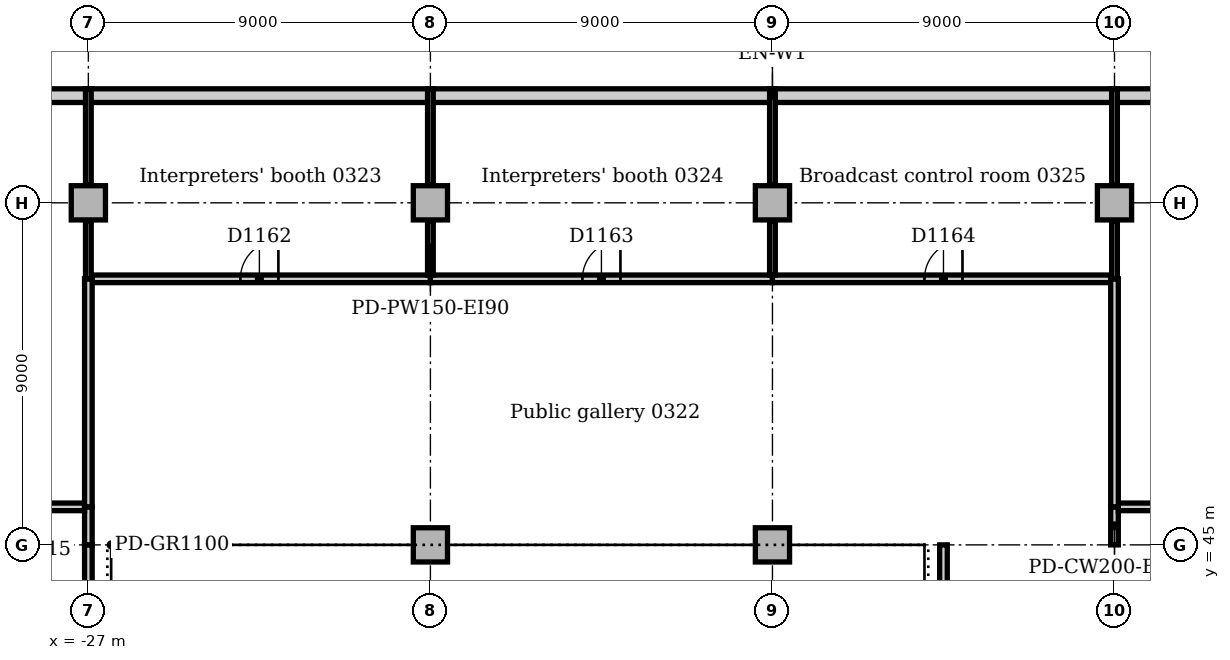
"""IFC4 building model, lengths in metres.
Left out: names, types, materials, properties, quantities, classifications, styles, units other than length and angle.
Written with IfcOpenShell. Run it as: python <this file> out.ifc"""

import sys

from ifc_helpers import new_model, si_unit, direction, frame, frame_2d, origin, origin_2d, place, context, subcontext, project, spatial, rectangle, extrude, element, fill, save


model = new_model("IFC4")
c1 = context("Model", 3, precision=1e-05, world=origin(), true_north=direction((0.0, 1.0)))
c2 = subcontext(c1, "Body", "Model", "MODEL_VIEW")
j1 = project(units=[si_unit("LENGTHUNIT", "METRE"), si_unit("PLANEANGLEUNIT", "RADIAN")], contexts=[c1])
p1 = place(None, origin())
s1 = spatial("IfcSite", under=j1, at=p1, CompositionType="ELEMENT")
p2 = place(p1, origin())
s2 = spatial("IfcBuilding", under=s1, at=p2, CompositionType="ELEMENT")
p3 = place(p2, frame((0.0, 0.0, 16.0)))
s3 = spatial("IfcBuildingStorey", under=s2, at=p3, CompositionType="ELEMENT", Elevation=16.0)
for number, where, z_axis, x_axis in (
    (1, (-27.0, 54.0, 0.0), (0.0, 0.0, 1.0), (1.0, 0.0, 0.0)),
    (2, (-18.0, 45.0, 0.0), (0.0, 0.0, 1.0), (1.0, 0.0, 0.0)),
    (3, (-18.0, 54.0, 0.0), (0.0, 0.0, 1.0), (1.0, 0.0, 0.0)),
    (4, (-9.0, 45.0, 0.0), (0.0, 0.0, 1.0), (1.0, 0.0, 0.0)),
    (5, (-9.0, 54.0, 0.0), (0.0, 0.0, 1.0), (1.0, 0.0, 0.0)),
    (6, (0.0, 54.0, 0.0), (0.0, 0.0, 1.0), (1.0, 0.0, 0.0)),
):
    element("IfcColumn", number, at=place(p3, frame(where, z_axis=z_axis, x_axis=x_axis)), inside=s3, PredefinedType="COLUMN", context=c2, shape_type="SweptSolid", body=[
        extrude(rectangle(XDim=0.9, YDim=0.9, at=origin_2d()), origin(), (0.0, 0.0, 1.0), 4.7),
    ])
p4 = place(p3, frame((63.0, 56.82, 0.0), z_axis=(0.0, 0.0, 1.0), x_axis=(-1.0, 0.0, 0.0)))
e7 = element("IfcWall", 7, at=p4, inside=s3, PredefinedType="STANDARD", context=c2, shape_type="SweptSolid", body=[
    extrude(rectangle(XDim=144.0, YDim=0.36, at=frame_2d((72.0, 0.0))), origin(), (0.0, 0.0, 1.0), 4.7),
])
p5 = place(p4, frame((2.85, 0.0, 0.9)))
e8 = element("IfcOpeningElement", 8, at=p5, cuts=e7, PredefinedType="OPENING", context=c2, shape_type="SweptSolid", body=[
    extrude(rectangle(XDim=3.3, YDim=2.4, at=frame_2d((1.65, 1.2))), frame((0.0, 0.19, 0.0), z_axis=(0.0, -1.0, 0.0), x_axis=(1.0, 0.0, 0.0)), (0.0, 0.0, 1.0), 0.38),
])
p6 = place(p4, frame((7.35, 0.0, 0.9)))
e9 = element("IfcOpeningElement", 9, at=p6, cuts=e7, PredefinedType="OPENING", context=c2, shape_type="SweptSolid", body=[
    extrude(rectangle(XDim=3.3, YDim=2.4, at=frame_2d((1.65, 1.2))), frame((0.0, 0.19, 0.0), z_axis=(0.0, -1.0, 0.0), x_axis=(1.0, 0.0, 0.0)), (0.0, 0.0, 1.0), 0.38),
])
p7 = place(p4, frame((11.85, 0.0, 0.9)))
e10 = element("IfcOpeningElement", 10, at=p7, cuts=e7, PredefinedType="OPENING", context=c2, shape_type="SweptSolid", body=[
    extrude(rectangle(XDim=3.3, YDim=2.4, at=frame_2d((1.65, 1.2))), frame((0.0, 0.19, 0.0), z_axis=(0.0, -1.0, 0.0), x_axis=(1.0, 0.0, 0.0)), (0.0, 0.0, 1.0), 0.38),
])
p8 = place(p4, frame((16.35, 0.0, 0.9)))
e11 = element("IfcOpeningElement", 11, at=p8, cuts=e7, PredefinedType="OPENING", context=c2, shape_type="SweptSolid", body=[
    extrude(rectangle(XDim=3.3, YDim=2.4, at=frame_2d((1.65, 1.2))), frame((0.0, 0.19, 0.0), z_axis=(0.0, -1.0, 0.0), x_axis=(1.0, 0.0, 0.0)), (0.0, 0.0, 1.0), 0.38),
])
p9 = place(p4, frame((20.85, 0.0, 0.9)))
e12 = element("IfcOpeningElement", 12, at=p9, cuts=e7, PredefinedType="OPENING", context=c2, shape_type="SweptSolid", body=[
    extrude(rectangle(XDim=3.3, YDim=2.4, at=frame_2d((1.65, 1.2))), frame((0.0, 0.19, 0.0), z_axis=(0.0, -1.0, 0.0), x_axis=(1.0, 0.0, 0.0)), (0.0, 0.0, 1.0), 0.38),
])
p10 = place(p4, frame((25.35, 0.0, 0.9)))
e13 = element("IfcOpeningElement", 13, at=p10, cuts=e7, PredefinedType="OPENING", context=c2, shape_type="SweptSolid", body=[
    extrude(rectangle(XDim=3.3, YDim=2.4, at=frame_2d((1.65, 1.2))), frame((0.0, 0.19, 0.0), z_axis=(0.0, -1.0, 0.0), x_axis=(1.0, 0.0, 0.0)), (0.0, 0.0, 1.0), 0.38),
])
p11 = place(p4, frame((29.85, 0.0, 0.9)))
e14 = element("IfcOpeningElement", 14, at=p11, cuts=e7, PredefinedType="OPENING", context=c2, shape_type="SweptSolid", body=[
    extrude(rectangle(XDim=3.3, YDim=2.4, at=frame_2d((1.65, 1.2))), frame((0.0, 0.19, 0.0), z_axis=(0.0, -1.0, 0.0), x_axis=(1.0, 0.0, 0.0)), (0.0, 0.0, 1.0), 0.38),
])
p12 = place(p4, frame((34.35, 0.0, 0.9)))
e15 = element("IfcOpeningElement", 15, at=p12, cuts=e7, PredefinedType="OPENING", context=c2, shape_type="SweptSolid", body=[
    extrude(rectangle(XDim=3.3, YDim=2.4, at=frame_2d((1.65, 1.2))), frame((0.0, 0.19, 0.0), z_axis=(0.0, -1.0, 0.0), x_axis=(1.0, 0.0, 0.0)), (0.0, 0.0, 1.0), 0.38),
])
p13 = place(p4, frame((38.85, 0.0, 0.9)))
e16 = element("IfcOpeningElement", 16, at=p13, cuts=e7, PredefinedType="OPENING", context=c2, shape_type="SweptSolid", body=[
    extrude(rectangle(XDim=3.3, YDim=2.4, at=frame_2d((1.65, 1.2))), frame((0.0, 0.19, 0.0), z_axis=(0.0, -1.0, 0.0), x_axis=(1.0, 0.0, 0.0)), (0.0, 0.0, 1.0), 0.38),
])
p14 = place(p4, frame((43.35, 0.0, 0.9)))
e17 = element("IfcOpeningElement", 17, at=p14, cuts=e7, PredefinedType="OPENING", context=c2, shape_type="SweptSolid", body=[
    extrude(rectangle(XDim=3.3, YDim=2.4, at=frame_2d((1.65, 1.2))), frame((0.0, 0.19, 0.0), z_axis=(0.0, -1.0, 0.0), x_axis=(1.0, 0.0, 0.0)), (0.0, 0.0, 1.0), 0.38),
])
p15 = place(p4, frame((47.85, 0.0, 0.9)))
e18 = element("IfcOpeningElement", 18, at=p15, cuts=e7, PredefinedType="OPENING", context=c2, shape_type="SweptSolid", body=[
    extrude(rectangle(XDim=3.3, YDim=2.4, at=frame_2d((1.65, 1.2))), frame((0.0, 0.19, 0.0), z_axis=(0.0, -1.0, 0.0), x_axis=(1.0, 0.0, 0.0)), (0.0, 0.0, 1.0), 0.38),
])
p16 = place(p4, frame((52.35, 0.0, 0.9)))
e19 = element("IfcOpeningElement", 19, at=p16, cuts=e7, PredefinedType="OPENING", context=c2, shape_type="SweptSolid", body=[
    extrude(rectangle(XDim=3.3, YDim=2.4, at=frame_2d((1.65, 1.2))), frame((0.0, 0.19, 0.0), z_axis=(0.0, -1.0, 0.0), x_axis=(1.0, 0.0, 0.0)), (0.0, 0.0, 1.0), 0.38),
])
p17 = place(p4, frame((56.85, 0.0, 0.9)))
e20 = element("IfcOpeningElement", 20, at=p17, cuts=e7, PredefinedType="OPENING", context=c2, shape_type="SweptSolid", body=[
    extrude(rectangle(XDim=3.3, YDim=2.4, at=frame_2d((1.65, 1.2))), frame((0.0, 0.19, 0.0), z_axis=(0.0, -1.0, 0.0), x_axis=(1.0, 0.0, 0.0)), (0.0, 0.0, 1.0), 0.38),
])
p18 = place(p4, frame((92.85, 0.0, 0.9)))
e21 = element("IfcOpeningElement", 21, at=p18, cuts=e7, PredefinedType="OPENING", context=c2, shape_type="SweptSolid", body=[
    extrude(rectangle(XDim=3.3, YDim=2.4, at=frame_2d((1.65, 1.2))), frame((0.0, 0.19, 0.0), z_axis=(0.0, -1.0, 0.0), x_axis=(1.0, 0.0, 0.0)), (0.0, 0.0, 1.0), 0.38),
])
p19 = place(p4, frame((97.35, 0.0, 0.9)))
e22 = element("IfcOpeningElement", 22, at=p19, cuts=e7, PredefinedType="OPENING", context=c2, shape_type="SweptSolid", body=[
    extrude(rectangle(XDim=3.3, YDim=2.4, at=frame_2d((1.65, 1.2))), frame((0.0, 0.19, 0.0), z_axis=(0.0, -1.0, 0.0), x_axis=(1.0, 0.0, 0.0)), (0.0, 0.0, 1.0), 0.38),
])
p20 = place(p4, frame((101.85, 0.0, 0.9)))
e23 = element("IfcOpeningElement", 23, at=p20, cuts=e7, PredefinedType="OPENING", context=c2, shape_type="SweptSolid", body=[
    extrude(rectangle(XDim=3.3, YDim=2.4, at=frame_2d((1.65, 1.2))), frame((0.0, 0.19, 0.0), z_axis=(0.0, -1.0, 0.0), x_axis=(1.0, 0.0, 0.0)), (0.0, 0.0, 1.0), 0.38),
])
p21 = place(p4, frame((106.35, 0.0, 0.9)))
e24 = element("IfcOpeningElement", 24, at=p21, cuts=e7, PredefinedType="OPENING", context=c2, shape_type="SweptSolid", body=[
    extrude(rectangle(XDim=3.3, YDim=2.4, at=frame_2d((1.65, 1.2))), frame((0.0, 0.19, 0.0), z_axis=(0.0, -1.0, 0.0), x_axis=(1.0, 0.0, 0.0)), (0.0, 0.0, 1.0), 0.38),
])
p22 = place(p4, frame((110.85, 0.0, 0.9)))
e25 = element("IfcOpeningElement", 25, at=p22, cuts=e7, PredefinedType="OPENING", context=c2, shape_type="SweptSolid", body=[
    extrude(rectangle(XDim=3.3, YDim=2.4, at=frame_2d((1.65, 1.2))), frame((0.0, 0.19, 0.0), z_axis=(0.0, -1.0, 0.0), x_axis=(1.0, 0.0, 0.0)), (0.0, 0.0, 1.0), 0.38),
])
p23 = place(p4, frame((115.35, 0.0, 0.9)))
e26 = element("IfcOpeningElement", 26, at=p23, cuts=e7, PredefinedType="OPENING", context=c2, shape_type="SweptSolid", body=[
    extrude(rectangle(XDim=3.3, YDim=2.4, at=frame_2d((1.65, 1.2))), frame((0.0, 0.19, 0.0), z_axis=(0.0, -1.0, 0.0), x_axis=(1.0, 0.0, 0.0)), (0.0, 0.0, 1.0), 0.38),
])
p24 = place(p4, frame((119.85, 0.0, 0.9)))
e27 = element("IfcOpeningElement", 27, at=p24, cuts=e7, PredefinedType="OPENING", context=c2, shape_type="SweptSolid", body=[
    extrude(rectangle(XDim=3.3, YDim=2.4, at=frame_2d((1.65, 1.2))), frame((0.0, 0.19, 0.0), z_axis=(0.0, -1.0, 0.0), x_axis=(1.0, 0.0, 0.0)), (0.0, 0.0, 1.0), 0.38),
])
p25 = place(p4, frame((124.35, 0.0, 0.9)))
e28 = element("IfcOpeningElement", 28, at=p25, cuts=e7, PredefinedType="OPENING", context=c2, shape_type="SweptSolid", body=[
    extrude(rectangle(XDim=3.3, YDim=2.4, at=frame_2d((1.65, 1.2))), frame((0.0, 0.19, 0.0), z_axis=(0.0, -1.0, 0.0), x_axis=(1.0, 0.0, 0.0)), (0.0, 0.0, 1.0), 0.38),
])
p26 = place(p4, frame((128.85, 0.0, 0.9)))
e29 = element("IfcOpeningElement", 29, at=p26, cuts=e7, PredefinedType="OPENING", context=c2, shape_type="SweptSolid", body=[
    extrude(rectangle(XDim=3.3, YDim=2.4, at=frame_2d((1.65, 1.2))), frame((0.0, 0.19, 0.0), z_axis=(0.0, -1.0, 0.0), x_axis=(1.0, 0.0, 0.0)), (0.0, 0.0, 1.0), 0.38),
])
p27 = place(p4, frame((133.35, 0.0, 0.9)))
e30 = element("IfcOpeningElement", 30, at=p27, cuts=e7, PredefinedType="OPENING", context=c2, shape_type="SweptSolid", body=[
    extrude(rectangle(XDim=3.3, YDim=2.4, at=frame_2d((1.65, 1.2))), frame((0.0, 0.19, 0.0), z_axis=(0.0, -1.0, 0.0), x_axis=(1.0, 0.0, 0.0)), (0.0, 0.0, 1.0), 0.38),
])
p28 = place(p4, frame((137.85, 0.0, 0.9)))
e31 = element("IfcOpeningElement", 31, at=p28, cuts=e7, PredefinedType="OPENING", context=c2, shape_type="SweptSolid", body=[
    extrude(rectangle(XDim=3.3, YDim=2.4, at=frame_2d((1.65, 1.2))), frame((0.0, 0.19, 0.0), z_axis=(0.0, -1.0, 0.0), x_axis=(1.0, 0.0, 0.0)), (0.0, 0.0, 1.0), 0.38),
])
p29 = place(p3, frame((-27.0, 42.0, 0.0), z_axis=(0.0, 0.0, 1.0), x_axis=(0.0, 1.0, 0.0)))
e32 = element("IfcWall", 32, at=p29, inside=s3, PredefinedType="PARTITIONING", context=c2, shape_type="SweptSolid", body=[
    extrude(rectangle(XDim=3.0, YDim=0.2, at=frame_2d((1.5, 0.0))), origin(), (0.0, 0.0, 1.0), 4.7),
])
p30 = place(p3, frame((-27.0, 45.0, 0.0), z_axis=(0.0, 0.0, 1.0), x_axis=(0.0, 1.0, 0.0)))
e33 = element("IfcWall", 33, at=p30, inside=s3, PredefinedType="PARTITIONING", context=c2, shape_type="SweptSolid", body=[
    extrude(rectangle(XDim=1.0, YDim=0.2, at=frame_2d((0.5, 0.0))), origin(), (0.0, 0.0, 1.0), 4.7),
])
p31 = place(p3, frame((-36.0, 46.0, 0.0), z_axis=(0.0, 0.0, 1.0), x_axis=(1.0, 0.0, 0.0)))
e34 = element("IfcWall", 34, at=p31, inside=s3, PredefinedType="PARTITIONING", context=c2, shape_type="SweptSolid", body=[
    extrude(rectangle(XDim=8.9, YDim=0.2, at=frame_2d((4.45, 0.0))), origin(), (0.0, 0.0, 1.0), 4.7),
])
p32 = place(p31, frame((4.0, 0.0, 0.0)))
e35 = element("IfcOpeningElement", 35, at=p32, cuts=e34, PredefinedType="OPENING", context=c2, shape_type="SweptSolid", body=[
    extrude(rectangle(XDim=1.0, YDim=2.1, at=frame_2d((0.5, 1.05))), frame((0.0, 0.11, 0.0), z_axis=(0.0, -1.0, 0.0), x_axis=(1.0, 0.0, 0.0)), (0.0, 0.0, 1.0), 0.22),
])
p33 = place(p3, frame((0.0, 45.0, 0.0), z_axis=(0.0, 0.0, 1.0), x_axis=(0.0, 1.0, 0.0)))
e36 = element("IfcWall", 36, at=p33, inside=s3, PredefinedType="PARTITIONING", context=c2, shape_type="SweptSolid", body=[
    extrude(rectangle(XDim=1.0, YDim=0.2, at=frame_2d((0.5, 0.0))), origin(), (0.0, 0.0, 1.0), 4.7),
])
p34 = place(p3, frame((0.1, 46.0, 0.0), z_axis=(0.0, 0.0, 1.0), x_axis=(1.0, 0.0, 0.0)))
e37 = element("IfcWall", 37, at=p34, inside=s3, PredefinedType="PARTITIONING", context=c2, shape_type="SweptSolid", body=[
    extrude(rectangle(XDim=8.9, YDim=0.2, at=frame_2d((4.45, 0.0))), origin(), (0.0, 0.0, 1.0), 4.7),
])
p35 = place(p34, frame((3.9, 0.0, 0.0)))
e38 = element("IfcOpeningElement", 38, at=p35, cuts=e37, PredefinedType="OPENING", context=c2, shape_type="SweptSolid", body=[
    extrude(rectangle(XDim=1.0, YDim=2.1, at=frame_2d((0.5, 1.05))), frame((0.0, 0.11, 0.0), z_axis=(0.0, -1.0, 0.0), x_axis=(1.0, 0.0, 0.0)), (0.0, 0.0, 1.0), 0.22),
])
p36 = place(p3, frame((-4.5, 21.0, 0.0), z_axis=(0.0, 0.0, 1.0), x_axis=(0.0, 1.0, 0.0)))
e39 = element("IfcWall", 39, at=p36, inside=s3, PredefinedType="PARTITIONING", context=c2, shape_type="SweptSolid", body=[
    extrude(rectangle(XDim=24.0, YDim=0.2, at=frame_2d((12.0, 0.0))), origin(), (0.0, 0.0, 1.0), 4.7),
])
p37 = place(p3, frame((-26.9, 52.0, 0.0), z_axis=(0.0, 0.0, 1.0), x_axis=(1.0, 0.0, 0.0)))
e40 = element("IfcWall", 40, at=p37, inside=s3, PredefinedType="PARTITIONING", context=c2, shape_type="SweptSolid", body=[
    extrude(rectangle(XDim=8.9, YDim=0.2, at=frame_2d((4.45, 0.0))), origin(), (0.0, 0.0, 1.0), 4.7),
])
p38 = place(p37, frame((3.9, 0.0, 0.0)))
e41 = element("IfcOpeningElement", 41, at=p38, cuts=e40, PredefinedType="OPENING", context=c2, shape_type="SweptSolid", body=[
    extrude(rectangle(XDim=1.0, YDim=2.1, at=frame_2d((0.5, 1.05))), frame((0.0, 0.11, 0.0), z_axis=(0.0, -1.0, 0.0), x_axis=(1.0, 0.0, 0.0)), (0.0, 0.0, 1.0), 0.22),
])
p39 = place(p3, frame((-18.0, 52.0, 0.0), z_axis=(0.0, 0.0, 1.0), x_axis=(1.0, 0.0, 0.0)))
e42 = element("IfcWall", 42, at=p39, inside=s3, PredefinedType="PARTITIONING", context=c2, shape_type="SweptSolid", body=[
    extrude(rectangle(XDim=9.0, YDim=0.2, at=frame_2d((4.5, 0.0))), origin(), (0.0, 0.0, 1.0), 4.7),
])
p40 = place(p39, frame((4.0, 0.0, 0.0)))
e43 = element("IfcOpeningElement", 43, at=p40, cuts=e42, PredefinedType="OPENING", context=c2, shape_type="SweptSolid", body=[
    extrude(rectangle(XDim=1.0, YDim=2.1, at=frame_2d((0.5, 1.05))), frame((0.0, 0.11, 0.0), z_axis=(0.0, -1.0, 0.0), x_axis=(1.0, 0.0, 0.0)), (0.0, 0.0, 1.0), 0.22),
])
p41 = place(p3, frame((-9.0, 52.0, 0.0), z_axis=(0.0, 0.0, 1.0), x_axis=(1.0, 0.0, 0.0)))
e44 = element("IfcWall", 44, at=p41, inside=s3, PredefinedType="PARTITIONING", context=c2, shape_type="SweptSolid", body=[
    extrude(rectangle(XDim=8.9, YDim=0.2, at=frame_2d((4.45, 0.0))), origin(), (0.0, 0.0, 1.0), 4.7),
])
p42 = place(p41, frame((4.0, 0.0, 0.0)))
e45 = element("IfcOpeningElement", 45, at=p42, cuts=e44, PredefinedType="OPENING", context=c2, shape_type="SweptSolid", body=[
    extrude(rectangle(XDim=1.0, YDim=2.1, at=frame_2d((0.5, 1.05))), frame((0.0, 0.11, 0.0), z_axis=(0.0, -1.0, 0.0), x_axis=(1.0, 0.0, 0.0)), (0.0, 0.0, 1.0), 0.22),
])
for number, where, z_axis, x_axis in (
    (46, (-27.0, 46.0, 0.0), (0.0, 0.0, 1.0), (0.0, 1.0, 0.0)),
    (47, (0.0, 46.0, 0.0), (0.0, 0.0, 1.0), (0.0, 1.0, 0.0)),
):
    element("IfcWall", number, at=place(p3, frame(where, z_axis=z_axis, x_axis=x_axis)), inside=s3, PredefinedType="PARTITIONING", context=c2, shape_type="SweptSolid", body=[
        extrude(rectangle(XDim=6.0, YDim=0.2, at=frame_2d((3.0, 0.0))), origin(), (0.0, 0.0, 1.0), 4.7),
    ])
p43 = place(p3, frame((-18.0, 52.1, 0.0), z_axis=(0.0, 0.0, 1.0), x_axis=(0.0, 1.0, 0.0)))
e48 = element("IfcWall", 48, at=p43, inside=s3, PredefinedType="PARTITIONING", context=c2, shape_type="SweptSolid", body=[
    extrude(rectangle(XDim=1.43, YDim=0.15, at=frame_2d((0.715, 0.0))), origin(), (0.0, 0.0, 1.0), 4.7),
])
p44 = place(p3, frame((-18.0, 54.47, 0.0), z_axis=(0.0, 0.0, 1.0), x_axis=(0.0, 1.0, 0.0)))
e49 = element("IfcWall", 49, at=p44, inside=s3, PredefinedType="PARTITIONING", context=c2, shape_type="SweptSolid", body=[
    extrude(rectangle(XDim=2.53, YDim=0.15, at=frame_2d((1.265, 0.0))), origin(), (0.0, 0.0, 1.0), 4.7),
])
p45 = place(p3, frame((-27.0, 52.0, 0.0), z_axis=(0.0, 0.0, 1.0), x_axis=(0.0, 1.0, 0.0)))
e50 = element("IfcWall", 50, at=p45, inside=s3, PredefinedType="PARTITIONING", context=c2, shape_type="SweptSolid", body=[
    extrude(rectangle(XDim=1.53, YDim=0.15, at=frame_2d((0.765, 0.0))), origin(), (0.0, 0.0, 1.0), 4.7),
])
p46 = place(p3, frame((-27.0, 54.47, 0.0), z_axis=(0.0, 0.0, 1.0), x_axis=(0.0, 1.0, 0.0)))
e51 = element("IfcWall", 51, at=p46, inside=s3, PredefinedType="PARTITIONING", context=c2, shape_type="SweptSolid", body=[
    extrude(rectangle(XDim=2.53, YDim=0.15, at=frame_2d((1.265, 0.0))), origin(), (0.0, 0.0, 1.0), 4.7),
])
p47 = place(p3, frame((-9.0, 52.1, 0.0), z_axis=(0.0, 0.0, 1.0), x_axis=(0.0, 1.0, 0.0)))
e52 = element("IfcWall", 52, at=p47, inside=s3, PredefinedType="PARTITIONING", context=c2, shape_type="SweptSolid", body=[
    extrude(rectangle(XDim=1.43, YDim=0.15, at=frame_2d((0.715, 0.0))), origin(), (0.0, 0.0, 1.0), 4.7),
])
p48 = place(p3, frame((-9.0, 54.47, 0.0), z_axis=(0.0, 0.0, 1.0), x_axis=(0.0, 1.0, 0.0)))
e53 = element("IfcWall", 53, at=p48, inside=s3, PredefinedType="PARTITIONING", context=c2, shape_type="SweptSolid", body=[
    extrude(rectangle(XDim=2.53, YDim=0.15, at=frame_2d((1.265, 0.0))), origin(), (0.0, 0.0, 1.0), 4.7),
])
p49 = place(p3, frame((0.0, 52.0, 0.0), z_axis=(0.0, 0.0, 1.0), x_axis=(0.0, 1.0, 0.0)))
e54 = element("IfcWall", 54, at=p49, inside=s3, PredefinedType="PARTITIONING", context=c2, shape_type="SweptSolid", body=[
    extrude(rectangle(XDim=1.53, YDim=0.15, at=frame_2d((0.765, 0.0))), origin(), (0.0, 0.0, 1.0), 4.7),
])
p50 = place(p3, frame((0.0, 54.47, 0.0), z_axis=(0.0, 0.0, 1.0), x_axis=(0.0, 1.0, 0.0)))
e55 = element("IfcWall", 55, at=p50, inside=s3, PredefinedType="PARTITIONING", context=c2, shape_type="SweptSolid", body=[
    extrude(rectangle(XDim=2.53, YDim=0.15, at=frame_2d((1.265, 0.0))), origin(), (0.0, 0.0, 1.0), 4.7),
])
p51 = place(p38, origin())
e56 = element("IfcDoor", 56, at=p51, inside=s3, OperationType="SINGLE_SWING_RIGHT", PredefinedType="DOOR", context=c2, shape_type="SweptSolid", body=[
    extrude(rectangle(XDim=1.0, YDim=2.1, at=frame_2d((0.5, 1.05))), frame((0.0, 0.025, 0.0), z_axis=(0.0, -1.0, 0.0), x_axis=(1.0, 0.0, 0.0)), (0.0, 0.0, 1.0), 0.05),
])
fill(e41, e56)
p52 = place(p40, origin())
e57 = element("IfcDoor", 57, at=p52, inside=s3, OperationType="SINGLE_SWING_RIGHT", PredefinedType="DOOR", context=c2, shape_type="SweptSolid", body=[
    extrude(rectangle(XDim=1.0, YDim=2.1, at=frame_2d((0.5, 1.05))), frame((0.0, 0.025, 0.0), z_axis=(0.0, -1.0, 0.0), x_axis=(1.0, 0.0, 0.0)), (0.0, 0.0, 1.0), 0.05),
])
fill(e43, e57)
p53 = place(p42, origin())
e58 = element("IfcDoor", 58, at=p53, inside=s3, OperationType="SINGLE_SWING_RIGHT", PredefinedType="DOOR", context=c2, shape_type="SweptSolid", body=[
    extrude(rectangle(XDim=1.0, YDim=2.1, at=frame_2d((0.5, 1.05))), frame((0.0, 0.025, 0.0), z_axis=(0.0, -1.0, 0.0), x_axis=(1.0, 0.0, 0.0)), (0.0, 0.0, 1.0), 0.05),
])
fill(e45, e58)
save(model, sys.argv[1])
